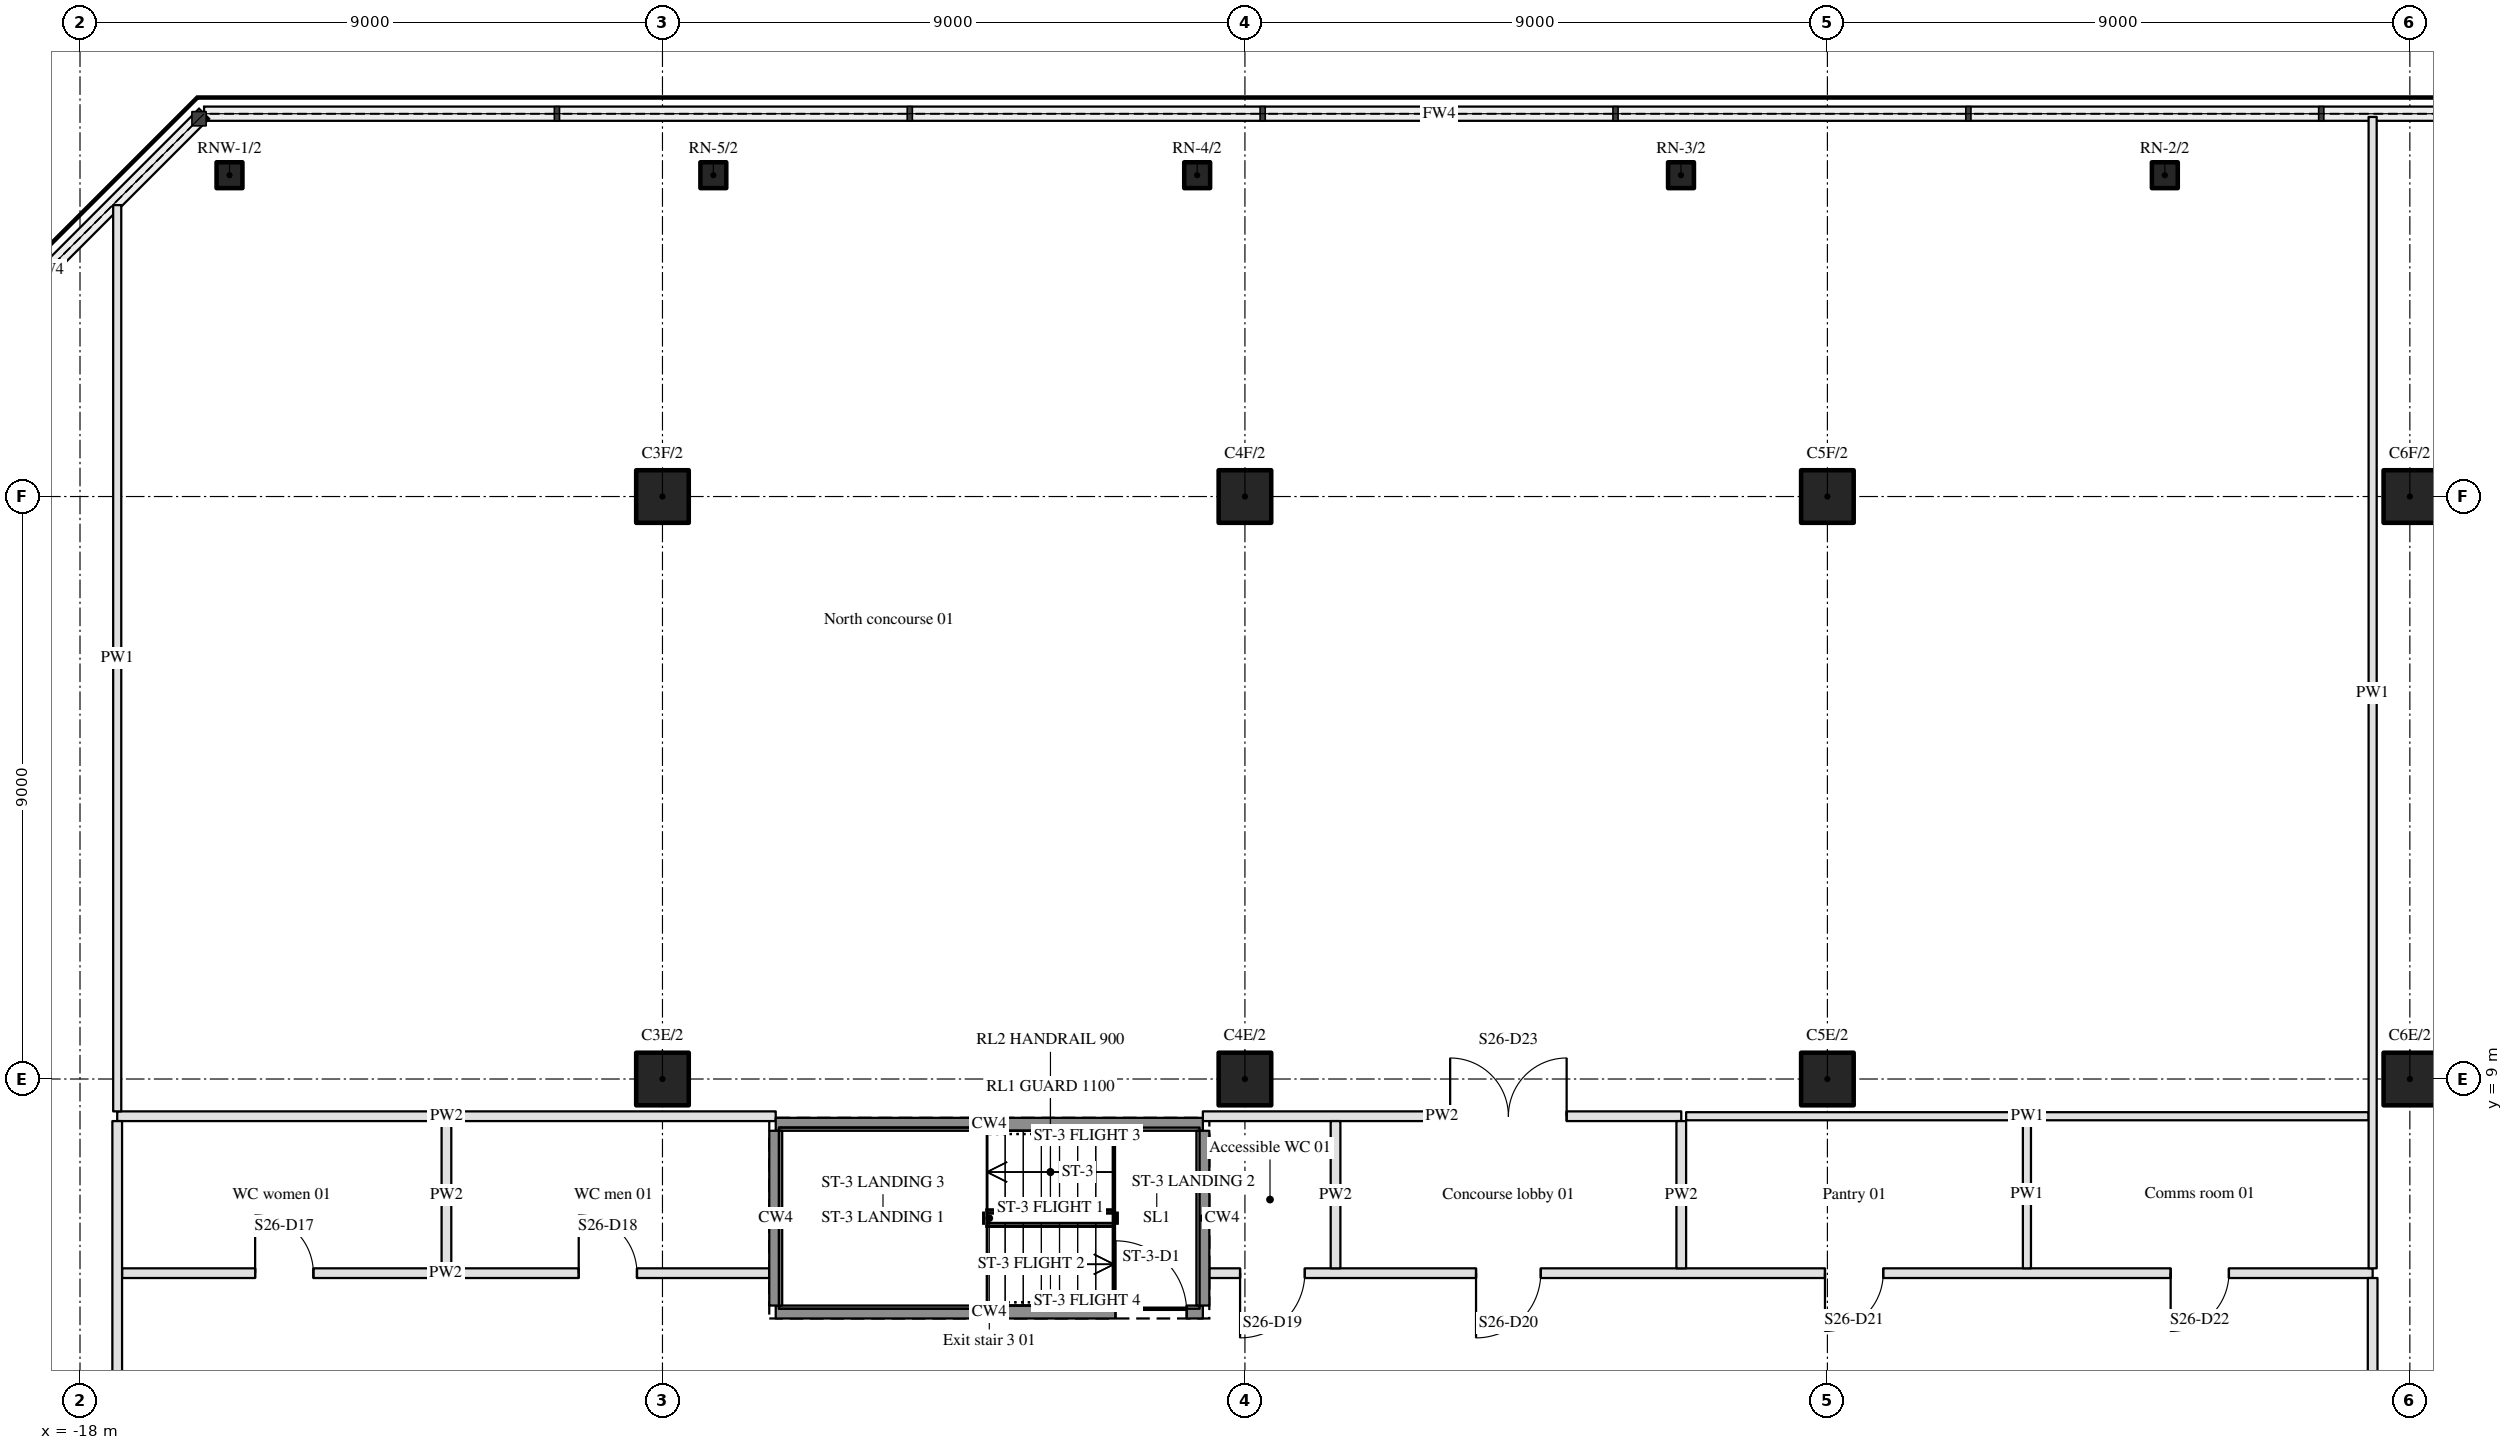
"""IFC4 building model, lengths in metres.
Left out: names, types, materials, properties, quantities, classifications, styles, units other than length and angle.
Written with IfcOpenShell. Run it as: python <this file> out.ifc"""

import sys

from ifc_helpers import new_model, si_unit, direction, frame, frame_2d, origin, origin_2d, place, context, subcontext, project, spatial, rectangle, hollow_rectangle, hollow_circle, extrude, element, fill, save


model = new_model("IFC4")
c1 = context("Model", 3, precision=1e-05, world=origin(), true_north=direction((0.0, 1.0)))
c2 = subcontext(c1, "Body", "Model", "MODEL_VIEW")
j1 = project(units=[si_unit("LENGTHUNIT", "METRE"), si_unit("PLANEANGLEUNIT", "RADIAN")], contexts=[c1])
p1 = place(None, origin())
s1 = spatial("IfcSite", under=j1, at=p1, CompositionType="ELEMENT")
p2 = place(p1, origin())
s2 = spatial("IfcBuilding", under=s1, at=p2, CompositionType="ELEMENT")
p3 = place(p2, frame((0.0, 0.0, 108.9)))
s3 = spatial("IfcBuildingStorey", under=s2, at=p3, CompositionType="ELEMENT", Elevation=108.9)
for number, where, z_axis, x_axis in (
    (1, (-9.0, 9.0, 0.0), (0.0, 0.0, 1.0), (1.0, 0.0, 0.0)),
    (2, (-9.0, 18.0, 0.0), (0.0, 0.0, 1.0), (1.0, 0.0, 0.0)),
    (3, (0.0, 9.0, 0.0), (0.0, 0.0, 1.0), (1.0, 0.0, 0.0)),
    (4, (0.0, 18.0, 0.0), (0.0, 0.0, 1.0), (1.0, 0.0, 0.0)),
    (5, (9.0, 9.0, 0.0), (0.0, 0.0, 1.0), (1.0, 0.0, 0.0)),
    (6, (9.0, 18.0, 0.0), (0.0, 0.0, 1.0), (1.0, 0.0, 0.0)),
    (7, (18.0, 9.0, 0.0), (0.0, 0.0, 1.0), (1.0, 0.0, 0.0)),
    (8, (18.0, 18.0, 0.0), (0.0, 0.0, 1.0), (1.0, 0.0, 0.0)),
):
    element("IfcColumn", number, at=place(p3, frame(where, z_axis=z_axis, x_axis=x_axis)), inside=s3, PredefinedType="COLUMN", context=c2, shape_type="SweptSolid", body=[
        extrude(hollow_circle(Radius=0.406, WallThickness=0.036, at=origin_2d()), origin(), (0.0, 0.0, 1.0), 5.4),
    ])
for number, where, z_axis, x_axis in (
    (9, (14.214, 22.965, 0.0), (0.0, 0.0, 1.0), (1.0, 0.0, 0.0)),
    (10, (6.738, 22.965, 0.0), (0.0, 0.0, 1.0), (1.0, 0.0, 0.0)),
    (11, (-0.738, 22.965, 0.0), (0.0, 0.0, 1.0), (1.0, 0.0, 0.0)),
    (12, (-8.214, 22.965, 0.0), (0.0, 0.0, 1.0), (1.0, 0.0, 0.0)),
    (13, (-15.69, 22.965, 0.0), (0.0, 0.0, 1.0), (1.0, 0.0, 0.0)),
):
    element("IfcColumn", number, at=place(p3, frame(where, z_axis=z_axis, x_axis=x_axis)), inside=s3, PredefinedType="COLUMN", context=c2, shape_type="SweptSolid", body=[
        extrude(hollow_rectangle(XDim=0.4, YDim=0.4, WallThickness=0.025, InnerFilletRadius=0.038, OuterFilletRadius=0.062, at=origin_2d()), origin(), (0.0, 0.0, 1.0), 5.4),
    ])
p4 = place(p3, frame((-7.25, 5.4, 0.0), z_axis=(0.0, 0.0, 1.0), x_axis=(1.0, 0.0, 0.0)))
e14 = element("IfcWall", 14, at=p4, inside=s3, PredefinedType="SHEAR", context=c2, shape_type="SweptSolid", body=[
    extrude(rectangle(XDim=6.6, YDim=0.2, at=frame_2d((3.3, 0.0))), origin(), (0.0, 0.0, 1.0), 5.4),
])
p5 = place(p4, frame((5.25, 0.0, 0.0)))
e15 = element("IfcOpeningElement", 15, at=p5, cuts=e14, PredefinedType="OPENING", context=c2, shape_type="SweptSolid", body=[
    extrude(rectangle(XDim=1.1, YDim=2.1, at=frame_2d((0.55, 1.05))), frame((0.0, 0.11, 0.0), z_axis=(0.0, -1.0, 0.0), x_axis=(1.0, 0.0, 0.0)), (0.0, 0.0, 1.0), 0.22),
])
p6 = place(p3, frame((-17.35, 6.0, 0.0), z_axis=(0.0, 0.0, 1.0), x_axis=(1.0, 0.0, 0.0)))
e16 = element("IfcWall", 16, at=p6, inside=s3, PredefinedType="PARTITIONING", context=c2, shape_type="SweptSolid", body=[
    extrude(rectangle(XDim=10.0, YDim=0.15, at=frame_2d((5.0, 0.0))), origin(), (0.0, 0.0, 1.0), 4.46),
])
p7 = place(p6, frame((2.056, 0.0, 0.0)))
e17 = element("IfcOpeningElement", 17, at=p7, cuts=e16, PredefinedType="OPENING", context=c2, shape_type="SweptSolid", body=[
    extrude(rectangle(XDim=0.9, YDim=2.1, at=frame_2d((0.45, 1.05))), frame((0.0, 0.085, 0.0), z_axis=(0.0, -1.0, 0.0), x_axis=(1.0, 0.0, 0.0)), (0.0, 0.0, 1.0), 0.17),
])
p8 = place(p6, frame((7.056, 0.0, 0.0)))
e18 = element("IfcOpeningElement", 18, at=p8, cuts=e16, PredefinedType="OPENING", context=c2, shape_type="SweptSolid", body=[
    extrude(rectangle(XDim=0.9, YDim=2.1, at=frame_2d((0.45, 1.05))), frame((0.0, 0.085, 0.0), z_axis=(0.0, -1.0, 0.0), x_axis=(1.0, 0.0, 0.0)), (0.0, 0.0, 1.0), 0.17),
])
p9 = place(p3, frame((17.425, 6.0, 0.0), z_axis=(0.0, 0.0, 1.0), x_axis=(-1.0, 0.0, 0.0)))
e19 = element("IfcWall", 19, at=p9, inside=s3, PredefinedType="PARTITIONING", context=c2, shape_type="SweptSolid", body=[
    extrude(rectangle(XDim=17.975, YDim=0.15, at=frame_2d((8.988, 0.0))), origin(), (0.0, 0.0, 1.0), 4.46),
])
p10 = place(p9, frame((12.854, 0.0, 0.0)))
e20 = element("IfcOpeningElement", 20, at=p10, cuts=e19, PredefinedType="OPENING", context=c2, shape_type="SweptSolid", body=[
    extrude(rectangle(XDim=1.0, YDim=2.1, at=frame_2d((0.5, 1.05))), frame((0.0, 0.085, 0.0), z_axis=(0.0, -1.0, 0.0), x_axis=(1.0, 0.0, 0.0)), (0.0, 0.0, 1.0), 0.17),
])
p11 = place(p9, frame((16.5, 0.0, 0.0)))
e21 = element("IfcOpeningElement", 21, at=p11, cuts=e19, PredefinedType="OPENING", context=c2, shape_type="SweptSolid", body=[
    extrude(rectangle(XDim=1.0, YDim=2.1, at=frame_2d((0.5, 1.05))), frame((0.0, 0.085, 0.0), z_axis=(0.0, -1.0, 0.0), x_axis=(1.0, 0.0, 0.0)), (0.0, 0.0, 1.0), 0.17),
])
p12 = place(p9, frame((7.562, 0.0, 0.0)))
e22 = element("IfcOpeningElement", 22, at=p12, cuts=e19, PredefinedType="OPENING", context=c2, shape_type="SweptSolid", body=[
    extrude(rectangle(XDim=0.9, YDim=2.1, at=frame_2d((0.45, 1.05))), frame((0.0, 0.085, 0.0), z_axis=(0.0, -1.0, 0.0), x_axis=(1.0, 0.0, 0.0)), (0.0, 0.0, 1.0), 0.17),
])
p13 = place(p9, frame((2.221, 0.0, 0.0)))
e23 = element("IfcOpeningElement", 23, at=p13, cuts=e19, PredefinedType="OPENING", context=c2, shape_type="SweptSolid", body=[
    extrude(rectangle(XDim=0.9, YDim=2.1, at=frame_2d((0.45, 1.05))), frame((0.0, 0.085, 0.0), z_axis=(0.0, -1.0, 0.0), x_axis=(1.0, 0.0, 0.0)), (0.0, 0.0, 1.0), 0.17),
])
p14 = place(p3, frame((-7.25, 8.3, 0.0), z_axis=(0.0, 0.0, 1.0), x_axis=(1.0, 0.0, 0.0)))
e24 = element("IfcWall", 24, at=p14, inside=s3, PredefinedType="SHEAR", context=c2, shape_type="SweptSolid", body=[
    extrude(rectangle(XDim=6.6, YDim=0.2, at=frame_2d((3.3, 0.0))), origin(), (0.0, 0.0, 1.0), 5.4),
])
p15 = place(p3, frame((-17.425, 8.425, 0.0), z_axis=(0.0, 0.0, 1.0), x_axis=(1.0, 0.0, 0.0)))
e25 = element("IfcWall", 25, at=p15, inside=s3, PredefinedType="PARTITIONING", context=c2, shape_type="SweptSolid", body=[
    extrude(rectangle(XDim=10.175, YDim=0.15, at=frame_2d((5.087, 0.0))), origin(), (0.0, 0.0, 1.0), 4.46),
])
p16 = place(p3, frame((-0.65, 8.425, 0.0), z_axis=(0.0, 0.0, 1.0), x_axis=(1.0, 0.0, 0.0)))
e26 = element("IfcWall", 26, at=p16, inside=s3, PredefinedType="PARTITIONING", context=c2, shape_type="SweptSolid", body=[
    extrude(rectangle(XDim=7.392, YDim=0.15, at=frame_2d((3.696, 0.0))), origin(), (0.0, 0.0, 1.0), 4.46),
])
p17 = place(p16, frame((3.821, 0.0, 0.0)))
e27 = element("IfcOpeningElement", 27, at=p17, cuts=e26, PredefinedType="OPENING", context=c2, shape_type="SweptSolid", body=[
    extrude(rectangle(XDim=1.8, YDim=2.1, at=frame_2d((0.9, 1.05))), frame((0.0, 0.085, 0.0), z_axis=(0.0, -1.0, 0.0), x_axis=(1.0, 0.0, 0.0)), (0.0, 0.0, 1.0), 0.17),
])
p18 = place(p3, frame((6.817, 8.425, 0.0), z_axis=(0.0, 0.0, 1.0), x_axis=(1.0, 0.0, 0.0)))
e28 = element("IfcWall", 28, at=p18, inside=s3, PredefinedType="PARTITIONING", context=c2, shape_type="SweptSolid", body=[
    extrude(rectangle(XDim=10.546, YDim=0.125, at=frame_2d((5.273, 0.0))), origin(), (0.0, 0.0, 1.0), 4.46),
])
p19 = place(p3, frame((-17.425, 8.35, 0.0), z_axis=(0.0, 0.0, 1.0), x_axis=(0.0, -1.0, 0.0)))
e29 = element("IfcWall", 29, at=p19, inside=s3, PredefinedType="PARTITIONING", context=c2, shape_type="SweptSolid", body=[
    extrude(rectangle(XDim=23.275, YDim=0.15, at=frame_2d((11.638, 0.0))), origin(), (0.0, 0.0, 1.0), 4.46),
])
p20 = place(p19, frame((11.913, 0.0, 0.0)))
e30 = element("IfcOpeningElement", 30, at=p20, cuts=e29, PredefinedType="OPENING", context=c2, shape_type="SweptSolid", body=[
    extrude(rectangle(XDim=1.8, YDim=2.1, at=frame_2d((0.9, 1.05))), frame((0.0, 0.085, 0.0), z_axis=(0.0, -1.0, 0.0), x_axis=(1.0, 0.0, 0.0)), (0.0, 0.0, 1.0), 0.17),
])
p21 = place(p19, frame((9.812, 0.0, 0.0)))
e31 = element("IfcOpeningElement", 31, at=p21, cuts=e29, PredefinedType="OPENING", context=c2, shape_type="SweptSolid", body=[
    extrude(rectangle(XDim=1.8, YDim=2.1, at=frame_2d((0.9, 1.05))), frame((0.0, 0.085, 0.0), z_axis=(0.0, -1.0, 0.0), x_axis=(1.0, 0.0, 0.0)), (0.0, 0.0, 1.0), 0.17),
])
p22 = place(p3, frame((-17.425, 8.5, 0.0), z_axis=(0.0, 0.0, 1.0), x_axis=(0.0, 1.0, 0.0)))
e32 = element("IfcWall", 32, at=p22, inside=s3, PredefinedType="PARTITIONING", context=c2, shape_type="SweptSolid", body=[
    extrude(rectangle(XDim=14.003, YDim=0.125, at=frame_2d((7.001, 0.0))), origin(), (0.0, 0.0, 1.0), 4.46),
])
p23 = place(p3, frame((-12.338, 6.075, 0.0), z_axis=(0.0, 0.0, 1.0), x_axis=(0.0, 1.0, 0.0)))
e33 = element("IfcWall", 33, at=p23, inside=s3, PredefinedType="PARTITIONING", context=c2, shape_type="SweptSolid", body=[
    extrude(rectangle(XDim=2.275, YDim=0.15, at=frame_2d((1.138, 0.0))), origin(), (0.0, 0.0, 1.0), 4.46),
])
for number, where, z_axis, x_axis in (
    (34, (-7.25, 5.5, 0.0), (0.0, 0.0, 1.0), (0.0, 1.0, 0.0)),
    (35, (-0.65, 5.5, 0.0), (0.0, 0.0, 1.0), (0.0, 1.0, 0.0)),
):
    element("IfcWall", number, at=place(p3, frame(where, z_axis=z_axis, x_axis=x_axis)), inside=s3, PredefinedType="SHEAR", context=c2, shape_type="SweptSolid", body=[
        extrude(rectangle(XDim=2.7, YDim=0.2, at=frame_2d((1.35, 0.0))), origin(), (0.0, 0.0, 1.0), 5.4),
    ])
for number, where, z_axis, x_axis in (
    (36, (1.4, 6.075, 0.0), (0.0, 0.0, 1.0), (0.0, 1.0, 0.0)),
    (37, (6.742, 6.075, 0.0), (0.0, 0.0, 1.0), (0.0, 1.0, 0.0)),
):
    element("IfcWall", number, at=place(p3, frame(where, z_axis=z_axis, x_axis=x_axis)), inside=s3, PredefinedType="PARTITIONING", context=c2, shape_type="SweptSolid", body=[
        extrude(rectangle(XDim=2.275, YDim=0.15, at=frame_2d((1.138, 0.0))), origin(), (0.0, 0.0, 1.0), 4.46),
    ])
p24 = place(p3, frame((12.083, 6.075, 0.0), z_axis=(0.0, 0.0, 1.0), x_axis=(0.0, 1.0, 0.0)))
e38 = element("IfcWall", 38, at=p24, inside=s3, PredefinedType="PARTITIONING", context=c2, shape_type="SweptSolid", body=[
    extrude(rectangle(XDim=2.288, YDim=0.125, at=frame_2d((1.144, 0.0))), origin(), (0.0, 0.0, 1.0), 4.46),
])
p25 = place(p3, frame((17.425, -14.925, 0.0), z_axis=(0.0, 0.0, 1.0), x_axis=(0.0, 1.0, 0.0)))
e39 = element("IfcWall", 39, at=p25, inside=s3, PredefinedType="PARTITIONING", context=c2, shape_type="SweptSolid", body=[
    extrude(rectangle(XDim=20.85, YDim=0.15, at=frame_2d((10.425, 0.0))), origin(), (0.0, 0.0, 1.0), 4.46),
])
p26 = place(p25, frame((9.525, 0.0, 0.0)))
e40 = element("IfcOpeningElement", 40, at=p26, cuts=e39, PredefinedType="OPENING", context=c2, shape_type="SweptSolid", body=[
    extrude(rectangle(XDim=1.8, YDim=2.1, at=frame_2d((0.9, 1.05))), frame((0.0, 0.085, 0.0), z_axis=(0.0, -1.0, 0.0), x_axis=(1.0, 0.0, 0.0)), (0.0, 0.0, 1.0), 0.17),
])
p27 = place(p25, frame((11.625, 0.0, 0.0)))
e41 = element("IfcOpeningElement", 41, at=p27, cuts=e39, PredefinedType="OPENING", context=c2, shape_type="SweptSolid", body=[
    extrude(rectangle(XDim=1.8, YDim=2.1, at=frame_2d((0.9, 1.05))), frame((0.0, 0.085, 0.0), z_axis=(0.0, -1.0, 0.0), x_axis=(1.0, 0.0, 0.0)), (0.0, 0.0, 1.0), 0.17),
])
p28 = place(p3, frame((17.425, 6.075, 0.0), z_axis=(0.0, 0.0, 1.0), x_axis=(0.0, 1.0, 0.0)))
e42 = element("IfcWall", 42, at=p28, inside=s3, PredefinedType="PARTITIONING", context=c2, shape_type="SweptSolid", body=[
    extrude(rectangle(XDim=17.79, YDim=0.125, at=frame_2d((8.895, 0.0))), origin(), (0.0, 0.0, 1.0), 4.46),
])
p29 = place(p10, origin())
e43 = element("IfcDoor", 43, at=p29, inside=s3, OperationType="SINGLE_SWING_RIGHT", PredefinedType="DOOR", context=c2, shape_type="SweptSolid", body=[
    extrude(rectangle(XDim=1.0, YDim=2.1, at=frame_2d((0.5, 1.05))), frame((0.0, 0.025, 0.0), z_axis=(0.0, -1.0, 0.0), x_axis=(1.0, 0.0, 0.0)), (0.0, 0.0, 1.0), 0.05),
])
fill(e20, e43)
p30 = place(p17, origin())
e44 = element("IfcDoor", 44, at=p30, inside=s3, OperationType="DOUBLE_DOOR_SINGLE_SWING", PredefinedType="DOOR", context=c2, shape_type="SweptSolid", body=[
    extrude(rectangle(XDim=1.8, YDim=2.1, at=frame_2d((0.9, 1.05))), frame((0.0, 0.025, 0.0), z_axis=(0.0, -1.0, 0.0), x_axis=(1.0, 0.0, 0.0)), (0.0, 0.0, 1.0), 0.05),
])
fill(e27, e44)
p31 = place(p5, origin())
e45 = element("IfcDoor", 45, at=p31, inside=s3, OperationType="SINGLE_SWING_LEFT", PredefinedType="DOOR", context=c2, shape_type="SweptSolid", body=[
    extrude(rectangle(XDim=1.1, YDim=2.1, at=frame_2d((0.55, 1.05))), frame((0.0, 0.025, 0.0), z_axis=(0.0, -1.0, 0.0), x_axis=(1.0, 0.0, 0.0)), (0.0, 0.0, 1.0), 0.05),
])
fill(e15, e45)
p32 = place(p7, origin())
e46 = element("IfcDoor", 46, at=p32, inside=s3, OperationType="SINGLE_SWING_LEFT", PredefinedType="DOOR", context=c2, shape_type="SweptSolid", body=[
    extrude(rectangle(XDim=0.9, YDim=2.1, at=frame_2d((0.45, 1.05))), frame((0.0, 0.025, 0.0), z_axis=(0.0, -1.0, 0.0), x_axis=(1.0, 0.0, 0.0)), (0.0, 0.0, 1.0), 0.05),
])
fill(e17, e46)
p33 = place(p8, origin())
e47 = element("IfcDoor", 47, at=p33, inside=s3, OperationType="SINGLE_SWING_LEFT", PredefinedType="DOOR", context=c2, shape_type="SweptSolid", body=[
    extrude(rectangle(XDim=0.9, YDim=2.1, at=frame_2d((0.45, 1.05))), frame((0.0, 0.025, 0.0), z_axis=(0.0, -1.0, 0.0), x_axis=(1.0, 0.0, 0.0)), (0.0, 0.0, 1.0), 0.05),
])
fill(e18, e47)
p34 = place(p11, origin())
e48 = element("IfcDoor", 48, at=p34, inside=s3, OperationType="SINGLE_SWING_RIGHT", PredefinedType="DOOR", context=c2, shape_type="SweptSolid", body=[
    extrude(rectangle(XDim=1.0, YDim=2.1, at=frame_2d((0.5, 1.05))), frame((0.0, 0.025, 0.0), z_axis=(0.0, -1.0, 0.0), x_axis=(1.0, 0.0, 0.0)), (0.0, 0.0, 1.0), 0.05),
])
fill(e21, e48)
p35 = place(p12, origin())
e49 = element("IfcDoor", 49, at=p35, inside=s3, OperationType="SINGLE_SWING_RIGHT", PredefinedType="DOOR", context=c2, shape_type="SweptSolid", body=[
    extrude(rectangle(XDim=0.9, YDim=2.1, at=frame_2d((0.45, 1.05))), frame((0.0, 0.025, 0.0), z_axis=(0.0, -1.0, 0.0), x_axis=(1.0, 0.0, 0.0)), (0.0, 0.0, 1.0), 0.05),
])
fill(e22, e49)
p36 = place(p13, origin())
e50 = element("IfcDoor", 50, at=p36, inside=s3, OperationType="SINGLE_SWING_RIGHT", PredefinedType="DOOR", context=c2, shape_type="SweptSolid", body=[
    extrude(rectangle(XDim=0.9, YDim=2.1, at=frame_2d((0.45, 1.05))), frame((0.0, 0.025, 0.0), z_axis=(0.0, -1.0, 0.0), x_axis=(1.0, 0.0, 0.0)), (0.0, 0.0, 1.0), 0.05),
])
fill(e23, e50)
save(model, sys.argv[1])
